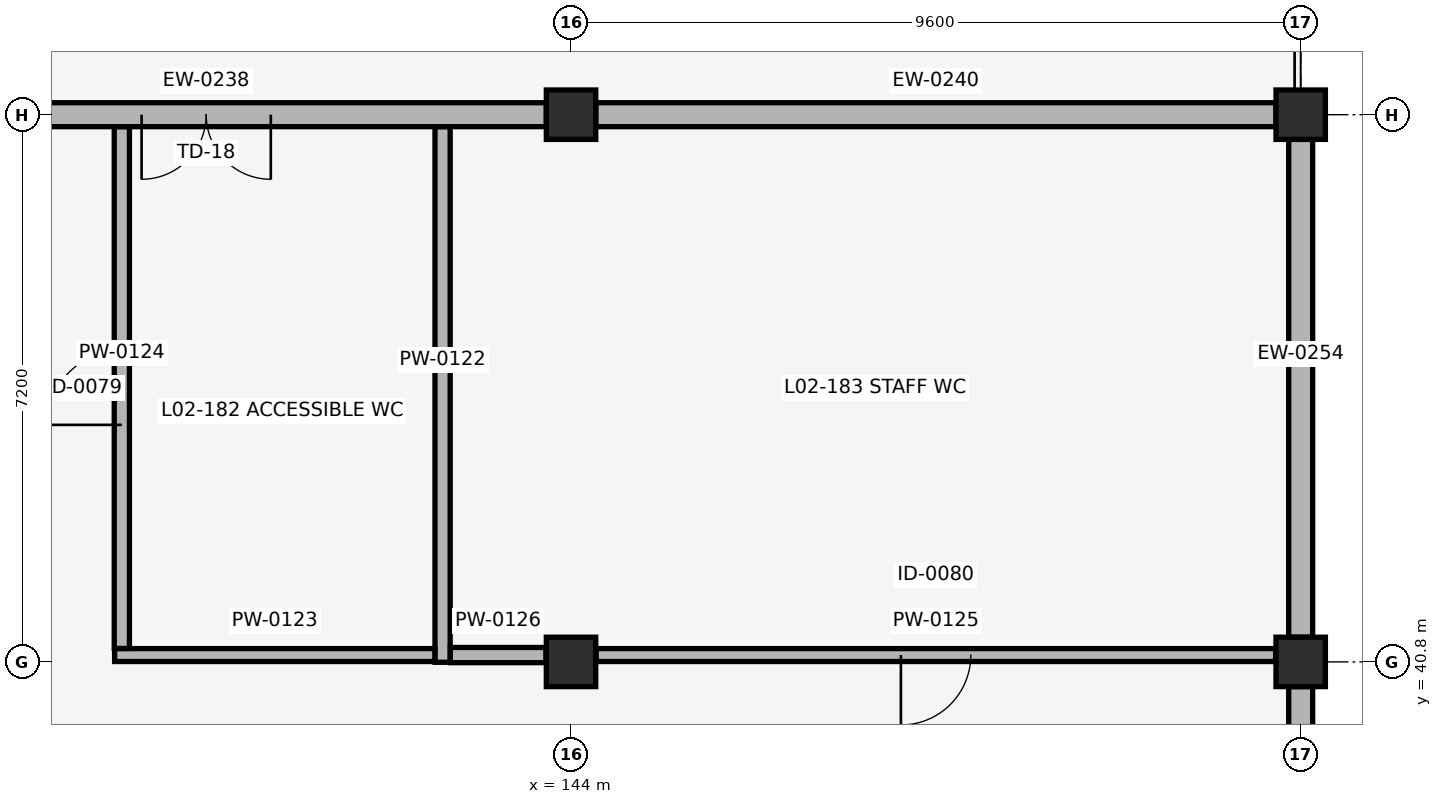
"""IFC4 building model, lengths in metres.
Left out: names, types, materials, properties, quantities, classifications, styles, units other than length and angle.
Written with IfcOpenShell. Run it as: python <this file> out.ifc"""

import sys

from ifc_helpers import new_model, si_unit, direction, frame, frame_2d, origin, origin_2d, place, context, subcontext, project, spatial, rectangle, extrude, element, fill, save


model = new_model("IFC4")
c1 = context("Model", 3, precision=1e-05, world=origin(), true_north=direction((0.0, 1.0)))
c2 = subcontext(c1, "Body", "Model", "MODEL_VIEW")
j1 = project(units=[si_unit("LENGTHUNIT", "METRE"), si_unit("PLANEANGLEUNIT", "RADIAN")], contexts=[c1])
p1 = place(None, origin())
s1 = spatial("IfcSite", under=j1, at=p1, CompositionType="ELEMENT")
p2 = place(p1, origin())
s2 = spatial("IfcBuilding", under=s1, at=p2, CompositionType="ELEMENT")
p3 = place(p2, frame((0.0, 0.0, 8.5)))
s3 = spatial("IfcBuildingStorey", under=s2, at=p3, CompositionType="ELEMENT", Elevation=8.5)
for number, where, z_axis, x_axis in (
    (1, (144.0, 40.8, 0.0), (0.0, 0.0, 1.0), (1.0, 0.0, 0.0)),
    (2, (144.0, 48.0, 0.0), (0.0, 0.0, 1.0), (1.0, 0.0, 0.0)),
    (3, (153.6, 40.8, 0.0), (0.0, 0.0, 1.0), (1.0, 0.0, 0.0)),
    (4, (153.6, 48.0, 0.0), (0.0, 0.0, 1.0), (1.0, 0.0, 0.0)),
):
    element("IfcColumn", number, at=place(p3, frame(where, z_axis=z_axis, x_axis=x_axis)), inside=s3, PredefinedType="COLUMN", context=c2, shape_type="SweptSolid", body=[
        extrude(rectangle(XDim=0.65, YDim=0.65, at=origin_2d()), origin(), (0.0, 0.0, 1.0), 4.08),
    ])
p4 = place(p3, frame((143.675, 48.0, 0.0), z_axis=(0.0, 0.0, 1.0), x_axis=(-1.0, 0.0, 0.0)))
e5 = element("IfcWall", 5, at=p4, inside=s3, PredefinedType="SOLIDWALL", context=c2, shape_type="SweptSolid", body=[
    extrude(rectangle(XDim=8.95, YDim=0.315, at=frame_2d((4.475, 0.0))), origin(), (0.0, 0.0, 1.0), 3.06),
])
p5 = place(p4, frame((3.625, 0.0, 0.0)))
e6 = element("IfcOpeningElement", 6, at=p5, cuts=e5, PredefinedType="OPENING", context=c2, shape_type="SweptSolid", body=[
    extrude(rectangle(XDim=1.7, YDim=2.2, at=frame_2d((0.85, 1.1))), frame((0.0, 0.167, 0.0), z_axis=(0.0, -1.0, 0.0), x_axis=(1.0, 0.0, 0.0)), (0.0, 0.0, 1.0), 0.335),
])
p6 = place(p3, frame((153.275, 48.0, 0.0), z_axis=(0.0, 0.0, 1.0), x_axis=(-1.0, 0.0, 0.0)))
e7 = element("IfcWall", 7, at=p6, inside=s3, PredefinedType="SOLIDWALL", context=c2, shape_type="SweptSolid", body=[
    extrude(rectangle(XDim=8.95, YDim=0.315, at=frame_2d((4.475, 0.0))), origin(), (0.0, 0.0, 1.0), 3.06),
])
for number, where, z_axis, x_axis in (
    (8, (153.6, 33.925, 0.0), (0.0, 0.0, 1.0), (0.0, 1.0, 0.0)),
    (9, (153.6, 41.125, 0.0), (0.0, 0.0, 1.0), (0.0, 1.0, 0.0)),
):
    element("IfcWall", number, at=place(p3, frame(where, z_axis=z_axis, x_axis=x_axis)), inside=s3, PredefinedType="SOLIDWALL", context=c2, shape_type="SweptSolid", body=[
        extrude(rectangle(XDim=6.55, YDim=0.315, at=frame_2d((3.275, 0.0))), origin(), (0.0, 0.0, 1.0), 3.06),
    ])
p7 = place(p3, frame((142.31, 40.795, 0.0), z_axis=(0.0, 0.0, 1.0), x_axis=(0.0, 1.0, 0.0)))
e10 = element("IfcWall", 10, at=p7, inside=s3, PredefinedType="PLUMBINGWALL", context=c2, shape_type="SweptSolid", body=[
    extrude(rectangle(XDim=7.046, YDim=0.2, at=frame_2d((3.523, 0.0))), origin(), (0.0, 0.0, 1.0), 3.06),
])
p8 = place(p3, frame((137.995, 40.89, 0.0), z_axis=(0.0, 0.0, 1.0), x_axis=(1.0, 0.0, 0.0)))
e11 = element("IfcWall", 11, at=p8, inside=s3, PredefinedType="PLUMBINGWALL", context=c2, shape_type="SweptSolid", body=[
    extrude(rectangle(XDim=4.213, YDim=0.17, at=frame_2d((2.106, 0.0))), origin(), (0.0, 0.0, 1.0), 3.06),
])
p9 = place(p3, frame((138.09, 40.977, 0.0), z_axis=(0.0, 0.0, 1.0), x_axis=(0.0, 1.0, 0.0)))
e12 = element("IfcWall", 12, at=p9, inside=s3, PredefinedType="PLUMBINGWALL", context=c2, shape_type="SweptSolid", body=[
    extrude(rectangle(XDim=6.864, YDim=0.2, at=frame_2d((3.432, 0.0))), origin(), (0.0, 0.0, 1.0), 3.06),
])
p10 = place(p9, frame((2.942, 0.0, 0.0)))
e13 = element("IfcOpeningElement", 13, at=p10, cuts=e12, PredefinedType="OPENING", context=c2, shape_type="SweptSolid", body=[
    extrude(rectangle(XDim=0.98, YDim=2.08, at=frame_2d((0.49, 1.04))), frame((0.0, 0.11, 0.0), z_axis=(0.0, -1.0, 0.0), x_axis=(1.0, 0.0, 0.0)), (0.0, 0.0, 1.0), 0.22),
])
p11 = place(p3, frame((144.33, 40.89, 0.0), z_axis=(0.0, 0.0, 1.0), x_axis=(1.0, 0.0, 0.0)))
e14 = element("IfcWall", 14, at=p11, inside=s3, PredefinedType="PLUMBINGWALL", context=c2, shape_type="SweptSolid", body=[
    extrude(rectangle(XDim=8.94, YDim=0.17, at=frame_2d((4.47, 0.0))), origin(), (0.0, 0.0, 1.0), 3.06),
])
p12 = place(p11, frame((4.01, 0.0, 0.0)))
e15 = element("IfcOpeningElement", 15, at=p12, cuts=e14, PredefinedType="OPENING", context=c2, shape_type="SweptSolid", body=[
    extrude(rectangle(XDim=0.92, YDim=2.08, at=frame_2d((0.46, 1.04))), frame((0.0, 0.095, 0.0), z_axis=(0.0, -1.0, 0.0), x_axis=(1.0, 0.0, 0.0)), (0.0, 0.0, 1.0), 0.19),
])
p13 = place(p3, frame((142.412, 40.89, 0.0), z_axis=(0.0, 0.0, 1.0), x_axis=(1.0, 0.0, 0.0)))
e16 = element("IfcWall", 16, at=p13, inside=s3, PredefinedType="PLUMBINGWALL", context=c2, shape_type="SweptSolid", body=[
    extrude(rectangle(XDim=1.258, YDim=0.2, at=frame_2d((0.629, 0.0))), origin(), (0.0, 0.0, 1.0), 3.06),
])
p14 = place(p5, origin())
e17 = element("IfcDoor", 17, at=p14, inside=s3, OperationType="DOUBLE_DOOR_SINGLE_SWING", PredefinedType="DOOR", context=c2, shape_type="SweptSolid", body=[
    extrude(rectangle(XDim=1.7, YDim=2.2, at=frame_2d((0.85, 1.1))), frame((0.0, 0.025, 0.0), z_axis=(0.0, -1.0, 0.0), x_axis=(1.0, 0.0, 0.0)), (0.0, 0.0, 1.0), 0.05),
])
fill(e6, e17)
p15 = place(p10, origin())
e18 = element("IfcDoor", 18, at=p15, inside=s3, OperationType="SINGLE_SWING_LEFT", PredefinedType="DOOR", context=c2, shape_type="SweptSolid", body=[
    extrude(rectangle(XDim=0.98, YDim=2.08, at=frame_2d((0.49, 1.04))), frame((0.0, 0.025, 0.0), z_axis=(0.0, -1.0, 0.0), x_axis=(1.0, 0.0, 0.0)), (0.0, 0.0, 1.0), 0.05),
])
fill(e13, e18)
p16 = place(p12, origin())
e19 = element("IfcDoor", 19, at=p16, inside=s3, OperationType="SINGLE_SWING_RIGHT", PredefinedType="DOOR", context=c2, shape_type="SweptSolid", body=[
    extrude(rectangle(XDim=0.92, YDim=2.08, at=frame_2d((0.46, 1.04))), frame((0.0, 0.025, 0.0), z_axis=(0.0, -1.0, 0.0), x_axis=(1.0, 0.0, 0.0)), (0.0, 0.0, 1.0), 0.05),
])
fill(e15, e19)
save(model, sys.argv[1])
